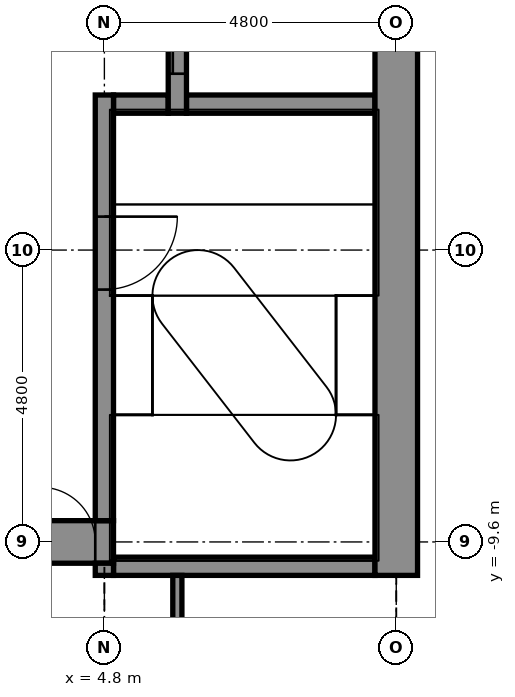
"""IFC4 building model, lengths in metres.
Left out: names, types, materials, properties, quantities, classifications, styles, units other than length and angle.
Written with IfcOpenShell. Run it as: python <this file> out.ifc"""

import sys

from ifc_helpers import new_model, si_unit, direction, frame, frame_2d, origin, place, context, subcontext, project, spatial, rectangle, extrude, element, fill, save


model = new_model("IFC4")
c1 = context("Model", 3, precision=1e-05, world=origin(), true_north=direction((0.0, 1.0)))
c2 = subcontext(c1, "Body", "Model", "MODEL_VIEW")
j1 = project(units=[si_unit("LENGTHUNIT", "METRE"), si_unit("PLANEANGLEUNIT", "RADIAN")], contexts=[c1])
p1 = place(None, origin())
s1 = spatial("IfcSite", under=j1, at=p1, CompositionType="ELEMENT")
p2 = place(p1, origin())
s2 = spatial("IfcBuilding", under=s1, at=p2, CompositionType="ELEMENT")
p3 = place(p2, frame((0.0, 0.0, 133.4)))
s3 = spatial("IfcBuildingStorey", under=s2, at=p3, CompositionType="ELEMENT", Elevation=133.4)
p4 = place(p3, frame((4.95, -10.0, -0.15), z_axis=(0.0, 0.0, 1.0), x_axis=(1.0, 0.0, 0.0)))
e1 = element("IfcWall", 1, at=p4, inside=s3, PredefinedType="STANDARD", context=c2, shape_type="SweptSolid", body=[
    extrude(rectangle(XDim=4.3, YDim=0.3, at=frame_2d((2.15, 0.0))), origin(), (0.0, 0.0, 1.0), 5.4),
])
p5 = place(p3, frame((-5.25, -9.6, -0.15), z_axis=(0.0, 0.0, 1.0), x_axis=(1.0, 0.0, 0.0)))
e2 = element("IfcWall", 2, at=p5, inside=s3, PredefinedType="SHEAR", context=c2, shape_type="SweptSolid", body=[
    extrude(rectangle(XDim=10.2, YDim=0.7, at=frame_2d((5.1, 0.0))), origin(), (0.0, 0.0, 1.0), 5.4),
])
p6 = place(p5, frame((9.0, 0.0, 0.15)))
e3 = element("IfcOpeningElement", 3, at=p6, cuts=e2, PredefinedType="OPENING", context=c2, shape_type="SweptSolid", body=[
    extrude(rectangle(XDim=0.9, YDim=2.1, at=frame_2d((0.45, 1.05))), frame((0.0, 0.36, 0.0), z_axis=(0.0, -1.0, 0.0), x_axis=(1.0, 0.0, 0.0)), (0.0, 0.0, 1.0), 0.72),
])
p7 = place(p3, frame((4.95, -2.4, -0.15), z_axis=(0.0, 0.0, 1.0), x_axis=(1.0, 0.0, 0.0)))
e4 = element("IfcWall", 4, at=p7, inside=s3, PredefinedType="STANDARD", context=c2, shape_type="SweptSolid", body=[
    extrude(rectangle(XDim=0.9, YDim=0.3, at=frame_2d((0.45, 0.0))), origin(), (0.0, 0.0, 1.0), 5.4),
])
p8 = place(p3, frame((6.15, -2.4, -0.15), z_axis=(0.0, 0.0, 1.0), x_axis=(1.0, 0.0, 0.0)))
e5 = element("IfcWall", 5, at=p8, inside=s3, PredefinedType="STANDARD", context=c2, shape_type="SweptSolid", body=[
    extrude(rectangle(XDim=3.1, YDim=0.3, at=frame_2d((1.55, 0.0))), origin(), (0.0, 0.0, 1.0), 5.4),
])
p9 = place(p3, frame((4.8, -10.15, -0.15), z_axis=(0.0, 0.0, 1.0), x_axis=(0.0, 1.0, 0.0)))
e6 = element("IfcWall", 6, at=p9, inside=s3, PredefinedType="STANDARD", context=c2, shape_type="SweptSolid", body=[
    extrude(rectangle(XDim=0.2, YDim=0.3, at=frame_2d((0.1, 0.0))), origin(), (0.0, 0.0, 1.0), 5.4),
])
p10 = place(p3, frame((4.8, -9.25, -0.15), z_axis=(0.0, 0.0, 1.0), x_axis=(0.0, 1.0, 0.0)))
e7 = element("IfcWall", 7, at=p10, inside=s3, PredefinedType="STANDARD", context=c2, shape_type="SweptSolid", body=[
    extrude(rectangle(XDim=7.0, YDim=0.3, at=frame_2d((3.5, 0.0))), origin(), (0.0, 0.0, 1.0), 5.4),
])
p11 = place(p10, frame((3.8, 0.0, 0.15)))
e8 = element("IfcOpeningElement", 8, at=p11, cuts=e7, PredefinedType="OPENING", context=c2, shape_type="SweptSolid", body=[
    extrude(rectangle(XDim=1.2, YDim=2.1, at=frame_2d((0.6, 1.05))), frame((0.0, 0.16, 0.0), z_axis=(0.0, -1.0, 0.0), x_axis=(1.0, 0.0, 0.0)), (0.0, 0.0, 1.0), 0.32),
])
p12 = place(p3, frame((6.0, -2.55, -0.15), z_axis=(0.0, 0.0, 1.0), x_axis=(0.0, 1.0, 0.0)))
e9 = element("IfcWall", 9, at=p12, inside=s3, PredefinedType="STANDARD", context=c2, shape_type="SweptSolid", body=[
    extrude(rectangle(XDim=7.5, YDim=0.3, at=frame_2d((3.75, 0.0))), origin(), (0.0, 0.0, 1.0), 5.4),
])
p13 = place(p12, frame((0.65, 0.0, 0.15)))
e10 = element("IfcOpeningElement", 10, at=p13, cuts=e9, PredefinedType="OPENING", context=c2, shape_type="SweptSolid", body=[
    extrude(rectangle(XDim=1.4, YDim=2.1, at=frame_2d((0.7, 1.05))), frame((0.0, 0.16, 0.0), z_axis=(0.0, -1.0, 0.0), x_axis=(1.0, 0.0, 0.0)), (0.0, 0.0, 1.0), 0.32),
])
p14 = place(p12, frame((3.05, 0.0, 0.15)))
e11 = element("IfcOpeningElement", 11, at=p14, cuts=e9, PredefinedType="OPENING", context=c2, shape_type="SweptSolid", body=[
    extrude(rectangle(XDim=1.4, YDim=2.1, at=frame_2d((0.7, 1.05))), frame((0.0, 0.16, 0.0), z_axis=(0.0, -1.0, 0.0), x_axis=(1.0, 0.0, 0.0)), (0.0, 0.0, 1.0), 0.32),
])
p15 = place(p12, frame((5.45, 0.0, 0.15)))
e12 = element("IfcOpeningElement", 12, at=p15, cuts=e9, PredefinedType="OPENING", context=c2, shape_type="SweptSolid", body=[
    extrude(rectangle(XDim=1.4, YDim=2.1, at=frame_2d((0.7, 1.05))), frame((0.0, 0.16, 0.0), z_axis=(0.0, -1.0, 0.0), x_axis=(1.0, 0.0, 0.0)), (0.0, 0.0, 1.0), 0.32),
])
p16 = place(p3, frame((9.6, -10.15, -0.15), z_axis=(0.0, 0.0, 1.0), x_axis=(0.0, 1.0, 0.0)))
e13 = element("IfcWall", 13, at=p16, inside=s3, PredefinedType="SHEAR", context=c2, shape_type="SweptSolid", body=[
    extrude(rectangle(XDim=20.1, YDim=0.7, at=frame_2d((10.05, 0.0))), origin(), (0.0, 0.0, 1.0), 5.4),
])
p17 = place(p3, frame((6.0, -13.6, 0.0), z_axis=(0.0, 0.0, 1.0), x_axis=(0.0, 1.0, 0.0)))
e14 = element("IfcWall", 14, at=p17, inside=s3, PredefinedType="PARTITIONING", context=c2, shape_type="SweptSolid", body=[
    extrude(rectangle(XDim=3.45, YDim=0.15, at=frame_2d((1.725, 0.0))), origin(), (0.0, 0.0, 1.0), 5.25),
])
p18 = place(p13, origin())
e15 = element("IfcDoor", 15, at=p18, inside=s3, OperationType="DOUBLE_DOOR_SLIDING", PredefinedType="DOOR", context=c2, shape_type="SweptSolid", body=[
    extrude(rectangle(XDim=1.4, YDim=2.1, at=frame_2d((0.7, 1.05))), frame((0.0, 0.025, 0.0), z_axis=(0.0, -1.0, 0.0), x_axis=(1.0, 0.0, 0.0)), (0.0, 0.0, 1.0), 0.05),
])
fill(e10, e15)
p19 = place(p11, frame((1.2, 0.0, 0.0), z_axis=(0.0, 0.0, 1.0), x_axis=(-1.0, 0.0, 0.0)))
e16 = element("IfcDoor", 16, at=p19, inside=s3, OperationType="SINGLE_SWING_RIGHT", PredefinedType="DOOR", context=c2, shape_type="SweptSolid", body=[
    extrude(rectangle(XDim=1.2, YDim=2.1, at=frame_2d((0.6, 1.05))), frame((0.0, 0.025, 0.0), z_axis=(0.0, -1.0, 0.0), x_axis=(1.0, 0.0, 0.0)), (0.0, 0.0, 1.0), 0.05),
])
fill(e8, e16)
p20 = place(p6, origin())
e17 = element("IfcDoor", 17, at=p20, inside=s3, OperationType="SINGLE_SWING_LEFT", PredefinedType="DOOR", context=c2, shape_type="SweptSolid", body=[
    extrude(rectangle(XDim=0.9, YDim=2.1, at=frame_2d((0.45, 1.05))), frame((0.0, 0.025, 0.0), z_axis=(0.0, -1.0, 0.0), x_axis=(1.0, 0.0, 0.0)), (0.0, 0.0, 1.0), 0.05),
])
fill(e3, e17)
save(model, sys.argv[1])
